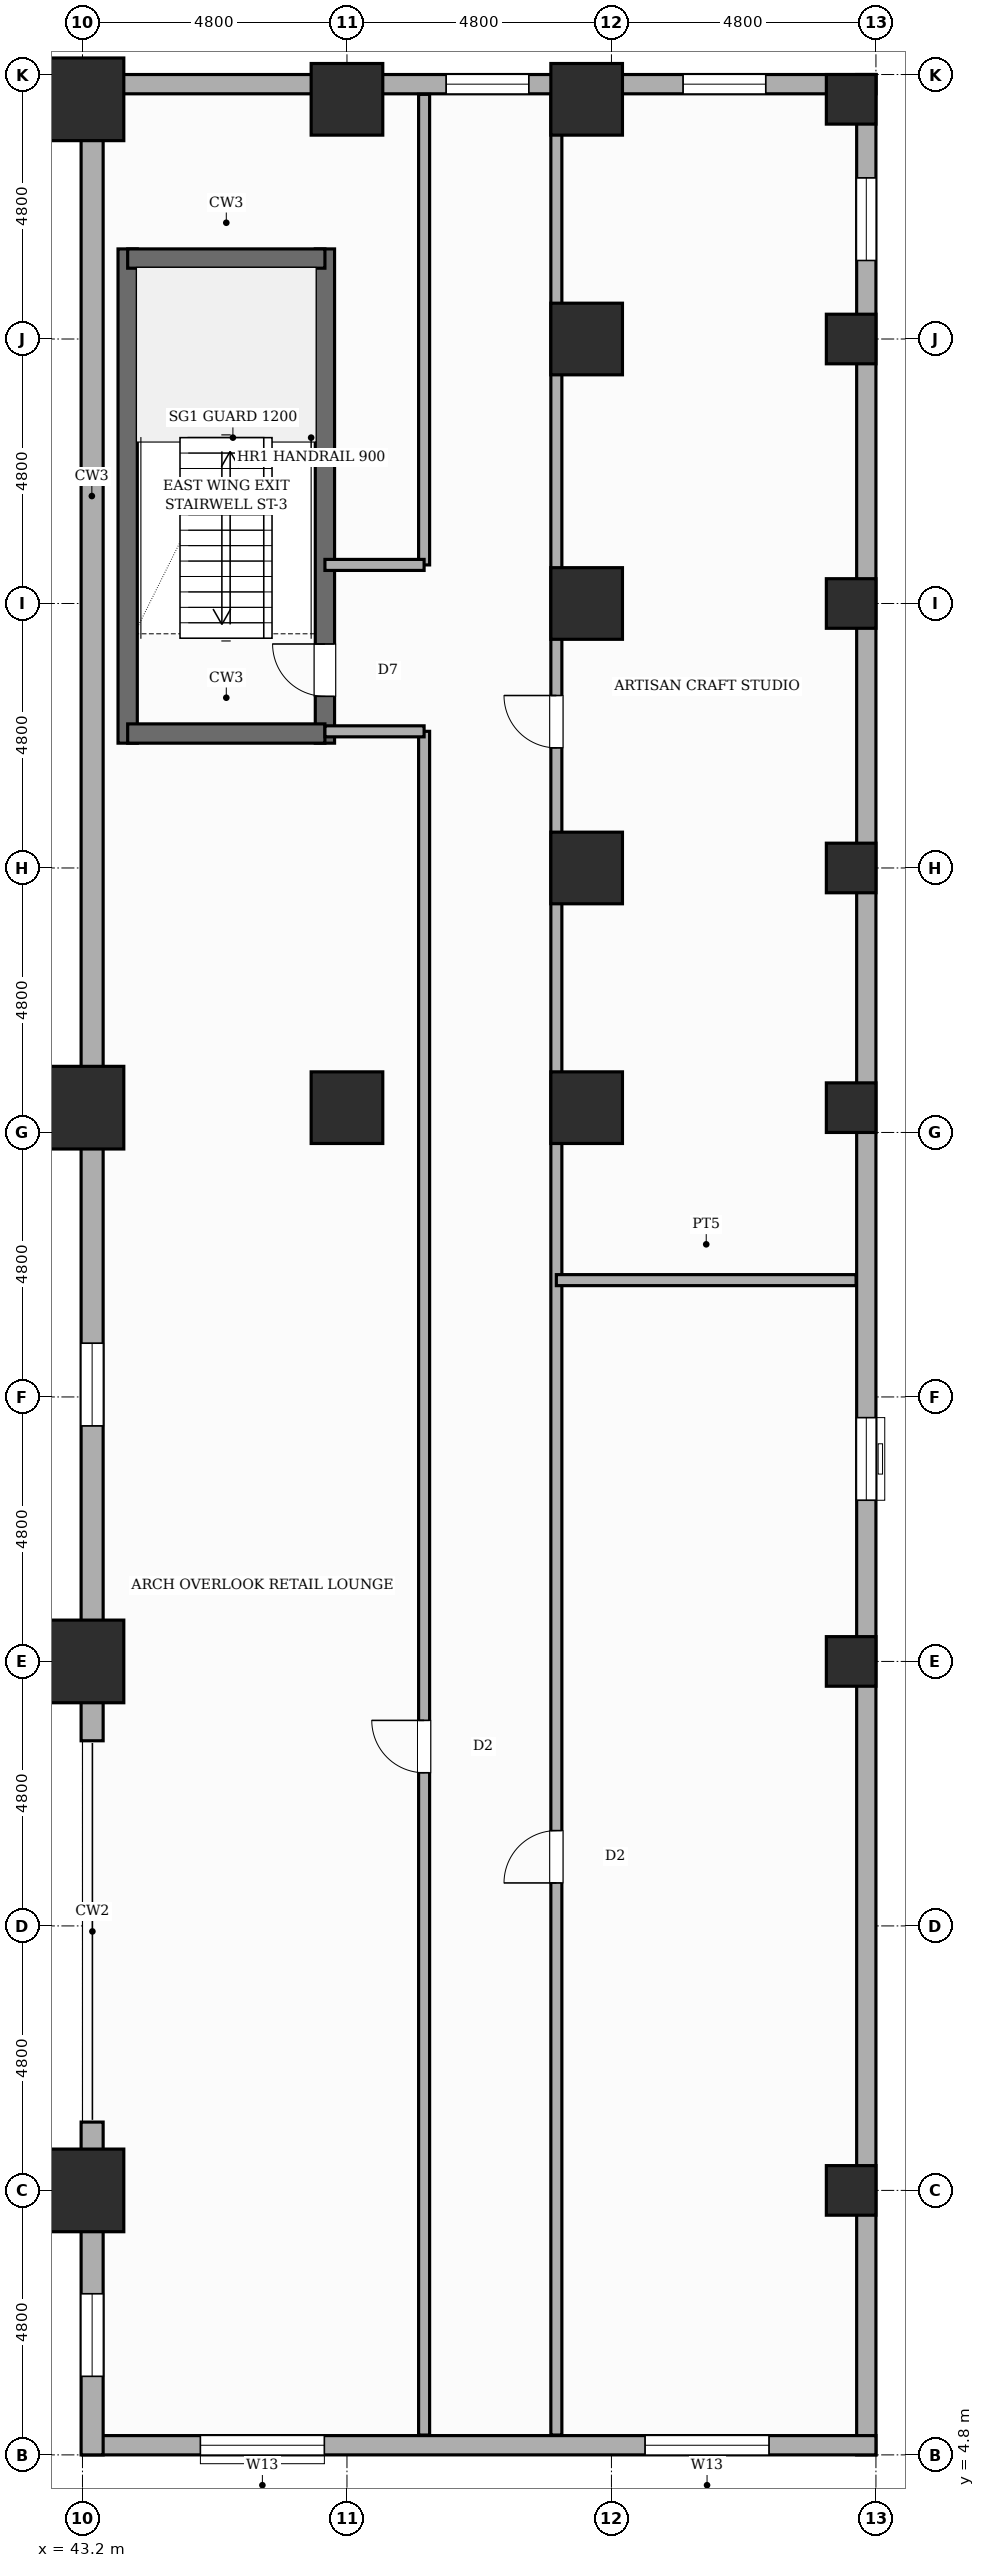
"""IFC4 building model, lengths in metres.
Left out: names, types, materials, properties, quantities, classifications, styles, units other than length and angle.
Written with IfcOpenShell. Run it as: python <this file> out.ifc"""

import sys

from ifc_helpers import new_model, si_unit, direction, frame, frame_2d, origin, origin_2d, place, context, subcontext, project, spatial, rectangle, circle, extrude, element, fill, save


model = new_model("IFC4")
c1 = context("Model", 3, precision=1e-05, world=origin(), true_north=direction((0.0, 1.0)))
c2 = subcontext(c1, "Body", "Model", "MODEL_VIEW")
j1 = project(units=[si_unit("LENGTHUNIT", "METRE"), si_unit("PLANEANGLEUNIT", "RADIAN")], contexts=[c1])
p1 = place(None, origin())
s1 = spatial("IfcSite", under=j1, at=p1, CompositionType="ELEMENT")
p2 = place(p1, origin())
s2 = spatial("IfcBuilding", under=s1, at=p2, CompositionType="ELEMENT")
p3 = place(p2, frame((0.0, 0.0, 10.0)))
s3 = spatial("IfcBuildingStorey", under=s2, at=p3, CompositionType="ELEMENT", Elevation=10.0)
p4 = place(p3, frame((44.02, 35.865, 0.0), z_axis=(0.0, 0.0, 1.0), x_axis=(0.0, 1.0, 0.0)))
e1 = element("IfcWall", 1, at=p4, inside=s3, PredefinedType="SHEAR", context=c2, shape_type="SweptSolid", body=[
    extrude(rectangle(XDim=8.97, YDim=0.35, at=frame_2d((4.485, 0.0))), origin(), (0.0, 0.0, 1.0), 4.8),
])
p5 = place(p3, frame((47.6, 35.865, 0.0), z_axis=(0.0, 0.0, 1.0), x_axis=(0.0, 1.0, 0.0)))
e2 = element("IfcWall", 2, at=p5, inside=s3, PredefinedType="SHEAR", context=c2, shape_type="SweptSolid", body=[
    extrude(rectangle(XDim=8.97, YDim=0.35, at=frame_2d((4.485, 0.0))), origin(), (0.0, 0.0, 1.0), 4.8),
])
p6 = place(p5, frame((0.85, 0.0, 0.0)))
e3 = element("IfcOpeningElement", 3, at=p6, cuts=e2, PredefinedType="OPENING", context=c2, shape_type="SweptSolid", body=[
    extrude(rectangle(XDim=0.95, YDim=2.1, at=frame_2d((0.475, 1.05))), frame((0.0, 0.185, 0.0), z_axis=(0.0, -1.0, 0.0), x_axis=(1.0, 0.0, 0.0)), (0.0, 0.0, 1.0), 0.37),
])
for number, where, z_axis, x_axis in (
    (4, (44.02, 36.04, 0.0), (0.0, 0.0, 1.0), (1.0, 0.0, 0.0)),
    (5, (44.02, 44.66, 0.0), (0.0, 0.0, 1.0), (1.0, 0.0, 0.0)),
):
    element("IfcWall", number, at=place(p3, frame(where, z_axis=z_axis, x_axis=x_axis)), inside=s3, PredefinedType="SHEAR", context=c2, shape_type="SweptSolid", body=[
        extrude(rectangle(XDim=3.58, YDim=0.35, at=frame_2d((1.79, 0.0))), origin(), (0.0, 0.0, 1.0), 4.8),
    ])
for number, where, z_axis, x_axis in (
    (6, (43.2, 9.6, 0.0), (0.0, 0.0, 1.0), (1.0, 0.0, 0.0)),
    (7, (43.2, 19.2, 0.0), (0.0, 0.0, 1.0), (1.0, 0.0, 0.0)),
    (8, (43.2, 29.25, 0.0), (0.0, 0.0, 1.0), (1.0, 0.0, 0.0)),
    (9, (43.2, 47.55, 0.0), (0.0, 0.0, 1.0), (1.0, 0.0, 0.0)),
):
    element("IfcColumn", number, at=place(p3, frame(where, z_axis=z_axis, x_axis=x_axis)), inside=s3, PredefinedType="USERDEFINED", context=c2, shape_type="SweptSolid", body=[
        extrude(rectangle(XDim=1.5, YDim=1.5, at=origin_2d()), origin(), (0.0, 0.0, 1.0), 4.8),
    ])
for number, where, z_axis, x_axis in (
    (10, (48.0, 29.25, 0.0), (0.0, 0.0, 1.0), (1.0, 0.0, 0.0)),
    (11, (48.0, 47.55, 0.0), (0.0, 0.0, 1.0), (1.0, 0.0, 0.0)),
    (12, (52.35, 29.25, 0.0), (0.0, 0.0, 1.0), (1.0, 0.0, 0.0)),
    (13, (52.35, 33.6, 0.0), (0.0, 0.0, 1.0), (1.0, 0.0, 0.0)),
    (14, (52.35, 38.4, 0.0), (0.0, 0.0, 1.0), (1.0, 0.0, 0.0)),
    (15, (52.35, 43.2, 0.0), (0.0, 0.0, 1.0), (1.0, 0.0, 0.0)),
    (16, (52.35, 47.55, 0.0), (0.0, 0.0, 1.0), (1.0, 0.0, 0.0)),
):
    element("IfcColumn", number, at=place(p3, frame(where, z_axis=z_axis, x_axis=x_axis)), inside=s3, PredefinedType="COLUMN", context=c2, shape_type="SweptSolid", body=[
        extrude(rectangle(XDim=1.3, YDim=1.3, at=origin_2d()), origin(), (0.0, 0.0, 1.0), 4.8),
    ])
for number, where, z_axis, x_axis in (
    (17, (57.15, 9.6, 0.0), (0.0, 0.0, 1.0), (1.0, 0.0, 0.0)),
    (18, (57.15, 19.2, 0.0), (0.0, 0.0, 1.0), (1.0, 0.0, 0.0)),
    (19, (57.15, 29.25, 0.0), (0.0, 0.0, 1.0), (1.0, 0.0, 0.0)),
    (20, (57.15, 33.6, 0.0), (0.0, 0.0, 1.0), (1.0, 0.0, 0.0)),
    (21, (57.15, 38.4, 0.0), (0.0, 0.0, 1.0), (1.0, 0.0, 0.0)),
    (22, (57.15, 43.2, 0.0), (0.0, 0.0, 1.0), (1.0, 0.0, 0.0)),
    (23, (57.15, 47.55, 0.0), (0.0, 0.0, 1.0), (1.0, 0.0, 0.0)),
):
    element("IfcColumn", number, at=place(p3, frame(where, z_axis=z_axis, x_axis=x_axis)), inside=s3, PredefinedType="COLUMN", context=c2, shape_type="SweptSolid", body=[
        extrude(circle(Radius=0.45, at=origin_2d()), origin(), (0.0, 0.0, 1.0), 4.8),
    ])
p7 = place(p3, frame((43.2, 47.825, 0.0), z_axis=(0.0, 0.0, 1.0), x_axis=(1.0, 0.0, 0.0)))
e24 = element("IfcWall", 24, at=p7, inside=s3, PredefinedType="STANDARD", context=c2, shape_type="SweptSolid", body=[
    extrude(rectangle(XDim=14.4, YDim=0.35, at=frame_2d((7.2, 0.0))), origin(), (0.0, 0.0, 1.0), 3.48),
])
p8 = place(p7, frame((6.6, 0.0, 0.85)))
e25 = element("IfcOpeningElement", 25, at=p8, cuts=e24, PredefinedType="OPENING", context=c2, shape_type="SweptSolid", body=[
    extrude(rectangle(XDim=1.5, YDim=2.1, at=frame_2d((0.75, 1.05))), frame((0.0, 0.185, 0.0), z_axis=(0.0, -1.0, 0.0), x_axis=(1.0, 0.0, 0.0)), (0.0, 0.0, 1.0), 0.37),
])
p9 = place(p7, frame((10.9, 0.0, 0.85)))
e26 = element("IfcOpeningElement", 26, at=p9, cuts=e24, PredefinedType="OPENING", context=c2, shape_type="SweptSolid", body=[
    extrude(rectangle(XDim=1.5, YDim=2.1, at=frame_2d((0.75, 1.05))), frame((0.0, 0.185, 0.0), z_axis=(0.0, -1.0, 0.0), x_axis=(1.0, 0.0, 0.0)), (0.0, 0.0, 1.0), 0.37),
])
p10 = place(p3, frame((57.425, 48.0, 0.0), z_axis=(0.0, 0.0, 1.0), x_axis=(0.0, -1.0, 0.0)))
e27 = element("IfcWall", 27, at=p10, inside=s3, PredefinedType="STANDARD", context=c2, shape_type="SweptSolid", body=[
    extrude(rectangle(XDim=43.2, YDim=0.35, at=frame_2d((21.6, 0.0))), origin(), (0.0, 0.0, 1.0), 3.48),
])
p11 = place(p10, frame((24.375, 0.0, 0.85)))
e28 = element("IfcOpeningElement", 28, at=p11, cuts=e27, PredefinedType="OPENING", context=c2, shape_type="SweptSolid", body=[
    extrude(rectangle(XDim=1.5, YDim=2.1, at=frame_2d((0.75, 1.05))), frame((0.0, 0.185, 0.0), z_axis=(0.0, -1.0, 0.0), x_axis=(1.0, 0.0, 0.0)), (0.0, 0.0, 1.0), 0.37),
])
p12 = place(p10, frame((1.875, 0.0, 0.85)))
e29 = element("IfcOpeningElement", 29, at=p12, cuts=e27, PredefinedType="OPENING", context=c2, shape_type="SweptSolid", body=[
    extrude(rectangle(XDim=1.5, YDim=2.1, at=frame_2d((0.75, 1.05))), frame((0.0, 0.185, 0.0), z_axis=(0.0, -1.0, 0.0), x_axis=(1.0, 0.0, 0.0)), (0.0, 0.0, 1.0), 0.37),
])
p13 = place(p3, frame((57.6, 4.975, 0.0), z_axis=(0.0, 0.0, 1.0), x_axis=(-1.0, 0.0, 0.0)))
e30 = element("IfcWall", 30, at=p13, inside=s3, PredefinedType="STANDARD", context=c2, shape_type="SweptSolid", body=[
    extrude(rectangle(XDim=14.4, YDim=0.35, at=frame_2d((7.2, 0.0))), origin(), (0.0, 0.0, 1.0), 4.4),
])
p14 = place(p13, frame((1.94, 0.0, 0.85)))
e31 = element("IfcOpeningElement", 31, at=p14, cuts=e30, PredefinedType="OPENING", context=c2, shape_type="SweptSolid", body=[
    extrude(rectangle(XDim=2.25, YDim=2.85, at=frame_2d((1.125, 1.425))), frame((0.0, 0.185, 0.0), z_axis=(0.0, -1.0, 0.0), x_axis=(1.0, 0.0, 0.0)), (0.0, 0.0, 1.0), 0.37),
])
p15 = place(p13, frame((10.01, 0.0, 0.85)))
e32 = element("IfcOpeningElement", 32, at=p15, cuts=e30, PredefinedType="OPENING", context=c2, shape_type="SweptSolid", body=[
    extrude(rectangle(XDim=2.25, YDim=2.85, at=frame_2d((1.125, 1.425))), frame((0.0, 0.185, 0.0), z_axis=(0.0, -1.0, 0.0), x_axis=(1.0, 0.0, 0.0)), (0.0, 0.0, 1.0), 0.37),
])
p16 = place(p3, frame((43.375, 4.8, 0.0), z_axis=(0.0, 0.0, 1.0), x_axis=(0.0, 1.0, 0.0)))
e33 = element("IfcWall", 33, at=p16, inside=s3, PredefinedType="SOLIDWALL", context=c2, shape_type="SweptSolid", body=[
    extrude(rectangle(XDim=6.04, YDim=0.4, at=frame_2d((3.02, 0.0))), origin(), (0.0, 0.0, 1.0), 3.48),
])
p17 = place(p16, frame((1.425, 0.0, 0.85)))
e34 = element("IfcOpeningElement", 34, at=p17, cuts=e33, PredefinedType="OPENING", context=c2, shape_type="SweptSolid", body=[
    extrude(rectangle(XDim=1.5, YDim=2.1, at=frame_2d((0.75, 1.05))), frame((0.0, 0.21, 0.0), z_axis=(0.0, -1.0, 0.0), x_axis=(1.0, 0.0, 0.0)), (0.0, 0.0, 1.0), 0.42),
])
p18 = place(p3, frame((43.375, 17.76, 0.0), z_axis=(0.0, 0.0, 1.0), x_axis=(0.0, 1.0, 0.0)))
e35 = element("IfcWall", 35, at=p18, inside=s3, PredefinedType="SOLIDWALL", context=c2, shape_type="SweptSolid", body=[
    extrude(rectangle(XDim=30.24, YDim=0.4, at=frame_2d((15.12, 0.0))), origin(), (0.0, 0.0, 1.0), 3.48),
])
p19 = place(p18, frame((5.715, 0.0, 0.85)))
e36 = element("IfcOpeningElement", 36, at=p19, cuts=e35, PredefinedType="OPENING", context=c2, shape_type="SweptSolid", body=[
    extrude(rectangle(XDim=1.5, YDim=2.1, at=frame_2d((0.75, 1.05))), frame((0.0, 0.21, 0.0), z_axis=(0.0, -1.0, 0.0), x_axis=(1.0, 0.0, 0.0)), (0.0, 0.0, 1.0), 0.42),
])
p20 = place(p3, frame((49.4, 5.16, 0.0), z_axis=(0.0, 0.0, 1.0), x_axis=(0.0, 1.0, 0.0)))
e37 = element("IfcWall", 37, at=p20, inside=s3, PredefinedType="PARTITIONING", context=c2, shape_type="SweptSolid", body=[
    extrude(rectangle(XDim=30.92, YDim=0.2, at=frame_2d((15.46, 0.0))), origin(), (0.0, 0.0, 1.0), 4.4),
])
p21 = place(p20, frame((12.02, 0.0, 0.0)))
e38 = element("IfcOpeningElement", 38, at=p21, cuts=e37, PredefinedType="OPENING", context=c2, shape_type="SweptSolid", body=[
    extrude(rectangle(XDim=0.95, YDim=2.15, at=frame_2d((0.475, 1.075))), frame((0.0, 0.11, 0.0), z_axis=(0.0, -1.0, 0.0), x_axis=(1.0, 0.0, 0.0)), (0.0, 0.0, 1.0), 0.22),
])
p22 = place(p3, frame((49.4, 39.1, 0.0), z_axis=(0.0, 0.0, 1.0), x_axis=(0.0, 1.0, 0.0)))
e39 = element("IfcWall", 39, at=p22, inside=s3, PredefinedType="PARTITIONING", context=c2, shape_type="SweptSolid", body=[
    extrude(rectangle(XDim=8.54, YDim=0.2, at=frame_2d((4.27, 0.0))), origin(), (0.0, 0.0, 1.0), 4.4),
])
for number, where, z_axis, x_axis in (
    (40, (47.6, 36.08, 0.0), (0.0, 0.0, 1.0), (1.0, 0.0, 0.0)),
    (41, (47.6, 39.1, 0.0), (0.0, 0.0, 1.0), (1.0, 0.0, 0.0)),
):
    element("IfcWall", number, at=place(p3, frame(where, z_axis=z_axis, x_axis=x_axis)), inside=s3, PredefinedType="PARTITIONING", context=c2, shape_type="SweptSolid", body=[
        extrude(rectangle(XDim=1.8, YDim=0.2, at=frame_2d((0.9, 0.0))), origin(), (0.0, 0.0, 1.0), 4.4),
    ])
p23 = place(p3, frame((51.8, 5.16, 0.0), z_axis=(0.0, 0.0, 1.0), x_axis=(0.0, 1.0, 0.0)))
e42 = element("IfcWall", 42, at=p23, inside=s3, PredefinedType="PARTITIONING", context=c2, shape_type="SweptSolid", body=[
    extrude(rectangle(XDim=42.48, YDim=0.2, at=frame_2d((21.24, 0.0))), origin(), (0.0, 0.0, 1.0), 4.4),
])
p24 = place(p23, frame((10.02, 0.0, 0.0)))
e43 = element("IfcOpeningElement", 43, at=p24, cuts=e42, PredefinedType="OPENING", context=c2, shape_type="SweptSolid", body=[
    extrude(rectangle(XDim=0.95, YDim=2.15, at=frame_2d((0.475, 1.075))), frame((0.0, 0.11, 0.0), z_axis=(0.0, -1.0, 0.0), x_axis=(1.0, 0.0, 0.0)), (0.0, 0.0, 1.0), 0.22),
])
p25 = place(p23, frame((30.62, 0.0, 0.0)))
e44 = element("IfcOpeningElement", 44, at=p25, cuts=e42, PredefinedType="OPENING", context=c2, shape_type="SweptSolid", body=[
    extrude(rectangle(XDim=0.95, YDim=2.15, at=frame_2d((0.475, 1.075))), frame((0.0, 0.11, 0.0), z_axis=(0.0, -1.0, 0.0), x_axis=(1.0, 0.0, 0.0)), (0.0, 0.0, 1.0), 0.22),
])
p26 = place(p3, frame((51.8, 26.12, 0.0), z_axis=(0.0, 0.0, 1.0), x_axis=(1.0, 0.0, 0.0)))
e45 = element("IfcWall", 45, at=p26, inside=s3, PredefinedType="SOLIDWALL", context=c2, shape_type="SweptSolid", body=[
    extrude(rectangle(XDim=5.44, YDim=0.2, at=frame_2d((2.72, 0.0))), origin(), (0.0, 0.0, 1.0), 4.4),
])
p27 = place(p8, origin())
e46 = element("IfcWindow", 46, at=p27, inside=s3, PartitioningType="SINGLE_PANEL", PredefinedType="WINDOW", context=c2, shape_type="SweptSolid", body=[
    extrude(rectangle(XDim=1.5, YDim=2.1, at=frame_2d((0.75, 1.05))), frame((0.0, 0.03, 0.0), z_axis=(0.0, -1.0, 0.0), x_axis=(1.0, 0.0, 0.0)), (0.0, 0.0, 1.0), 0.06),
])
fill(e25, e46)
p28 = place(p9, origin())
e47 = element("IfcWindow", 47, at=p28, inside=s3, PartitioningType="SINGLE_PANEL", PredefinedType="WINDOW", context=c2, shape_type="SweptSolid", body=[
    extrude(rectangle(XDim=1.5, YDim=2.1, at=frame_2d((0.75, 1.05))), frame((0.0, 0.03, 0.0), z_axis=(0.0, -1.0, 0.0), x_axis=(1.0, 0.0, 0.0)), (0.0, 0.0, 1.0), 0.06),
])
fill(e26, e47)
p29 = place(p11, origin())
e48 = element("IfcWindow", 48, at=p29, inside=s3, PartitioningType="SINGLE_PANEL", PredefinedType="WINDOW", context=c2, shape_type="SweptSolid", body=[
    extrude(rectangle(XDim=1.5, YDim=2.1, at=frame_2d((0.75, 1.05))), frame((0.0, 0.03, 0.0), z_axis=(0.0, -1.0, 0.0), x_axis=(1.0, 0.0, 0.0)), (0.0, 0.0, 1.0), 0.06),
])
fill(e28, e48)
p30 = place(p12, origin())
e49 = element("IfcWindow", 49, at=p30, inside=s3, PartitioningType="SINGLE_PANEL", PredefinedType="WINDOW", context=c2, shape_type="SweptSolid", body=[
    extrude(rectangle(XDim=1.5, YDim=2.1, at=frame_2d((0.75, 1.05))), frame((0.0, 0.03, 0.0), z_axis=(0.0, -1.0, 0.0), x_axis=(1.0, 0.0, 0.0)), (0.0, 0.0, 1.0), 0.06),
])
fill(e29, e49)
p31 = place(p14, origin())
e50 = element("IfcWindow", 50, at=p31, inside=s3, PartitioningType="SINGLE_PANEL", PredefinedType="WINDOW", context=c2, shape_type="SweptSolid", body=[
    extrude(rectangle(XDim=2.25, YDim=2.85, at=frame_2d((1.125, 1.425))), frame((0.0, 0.03, 0.0), z_axis=(0.0, -1.0, 0.0), x_axis=(1.0, 0.0, 0.0)), (0.0, 0.0, 1.0), 0.06),
])
fill(e31, e50)
p32 = place(p15, origin())
e51 = element("IfcWindow", 51, at=p32, inside=s3, PartitioningType="SINGLE_PANEL", PredefinedType="WINDOW", context=c2, shape_type="SweptSolid", body=[
    extrude(rectangle(XDim=2.25, YDim=2.85, at=frame_2d((1.125, 1.425))), frame((0.0, 0.03, 0.0), z_axis=(0.0, -1.0, 0.0), x_axis=(1.0, 0.0, 0.0)), (0.0, 0.0, 1.0), 0.06),
])
fill(e32, e51)
p33 = place(p17, origin())
e52 = element("IfcWindow", 52, at=p33, inside=s3, PartitioningType="SINGLE_PANEL", PredefinedType="WINDOW", context=c2, shape_type="SweptSolid", body=[
    extrude(rectangle(XDim=1.5, YDim=2.1, at=frame_2d((0.75, 1.05))), frame((0.0, 0.03, 0.0), z_axis=(0.0, -1.0, 0.0), x_axis=(1.0, 0.0, 0.0)), (0.0, 0.0, 1.0), 0.06),
])
fill(e34, e52)
p34 = place(p19, origin())
e53 = element("IfcWindow", 53, at=p34, inside=s3, PartitioningType="SINGLE_PANEL", PredefinedType="WINDOW", context=c2, shape_type="SweptSolid", body=[
    extrude(rectangle(XDim=1.5, YDim=2.1, at=frame_2d((0.75, 1.05))), frame((0.0, 0.03, 0.0), z_axis=(0.0, -1.0, 0.0), x_axis=(1.0, 0.0, 0.0)), (0.0, 0.0, 1.0), 0.06),
])
fill(e36, e53)
p35 = place(p6, origin())
e54 = element("IfcDoor", 54, at=p35, inside=s3, OperationType="SINGLE_SWING_RIGHT", PredefinedType="DOOR", context=c2, shape_type="SweptSolid", body=[
    extrude(rectangle(XDim=0.95, YDim=2.1, at=frame_2d((0.475, 1.05))), frame((0.0, 0.025, 0.0), z_axis=(0.0, -1.0, 0.0), x_axis=(1.0, 0.0, 0.0)), (0.0, 0.0, 1.0), 0.05),
])
fill(e3, e54)
p36 = place(p21, origin())
e55 = element("IfcDoor", 55, at=p36, inside=s3, OperationType="SINGLE_SWING_RIGHT", PredefinedType="DOOR", context=c2, shape_type="SweptSolid", body=[
    extrude(rectangle(XDim=0.95, YDim=2.15, at=frame_2d((0.475, 1.075))), frame((0.0, 0.025, 0.0), z_axis=(0.0, -1.0, 0.0), x_axis=(1.0, 0.0, 0.0)), (0.0, 0.0, 1.0), 0.05),
])
fill(e38, e55)
p37 = place(p24, origin())
e56 = element("IfcDoor", 56, at=p37, inside=s3, OperationType="SINGLE_SWING_LEFT", PredefinedType="DOOR", context=c2, shape_type="SweptSolid", body=[
    extrude(rectangle(XDim=0.95, YDim=2.15, at=frame_2d((0.475, 1.075))), frame((0.0, 0.025, 0.0), z_axis=(0.0, -1.0, 0.0), x_axis=(1.0, 0.0, 0.0)), (0.0, 0.0, 1.0), 0.05),
])
fill(e43, e56)
p38 = place(p25, origin())
e57 = element("IfcDoor", 57, at=p38, inside=s3, OperationType="SINGLE_SWING_RIGHT", PredefinedType="DOOR", context=c2, shape_type="SweptSolid", body=[
    extrude(rectangle(XDim=0.95, YDim=2.15, at=frame_2d((0.475, 1.075))), frame((0.0, 0.025, 0.0), z_axis=(0.0, -1.0, 0.0), x_axis=(1.0, 0.0, 0.0)), (0.0, 0.0, 1.0), 0.05),
])
fill(e44, e57)
save(model, sys.argv[1])
